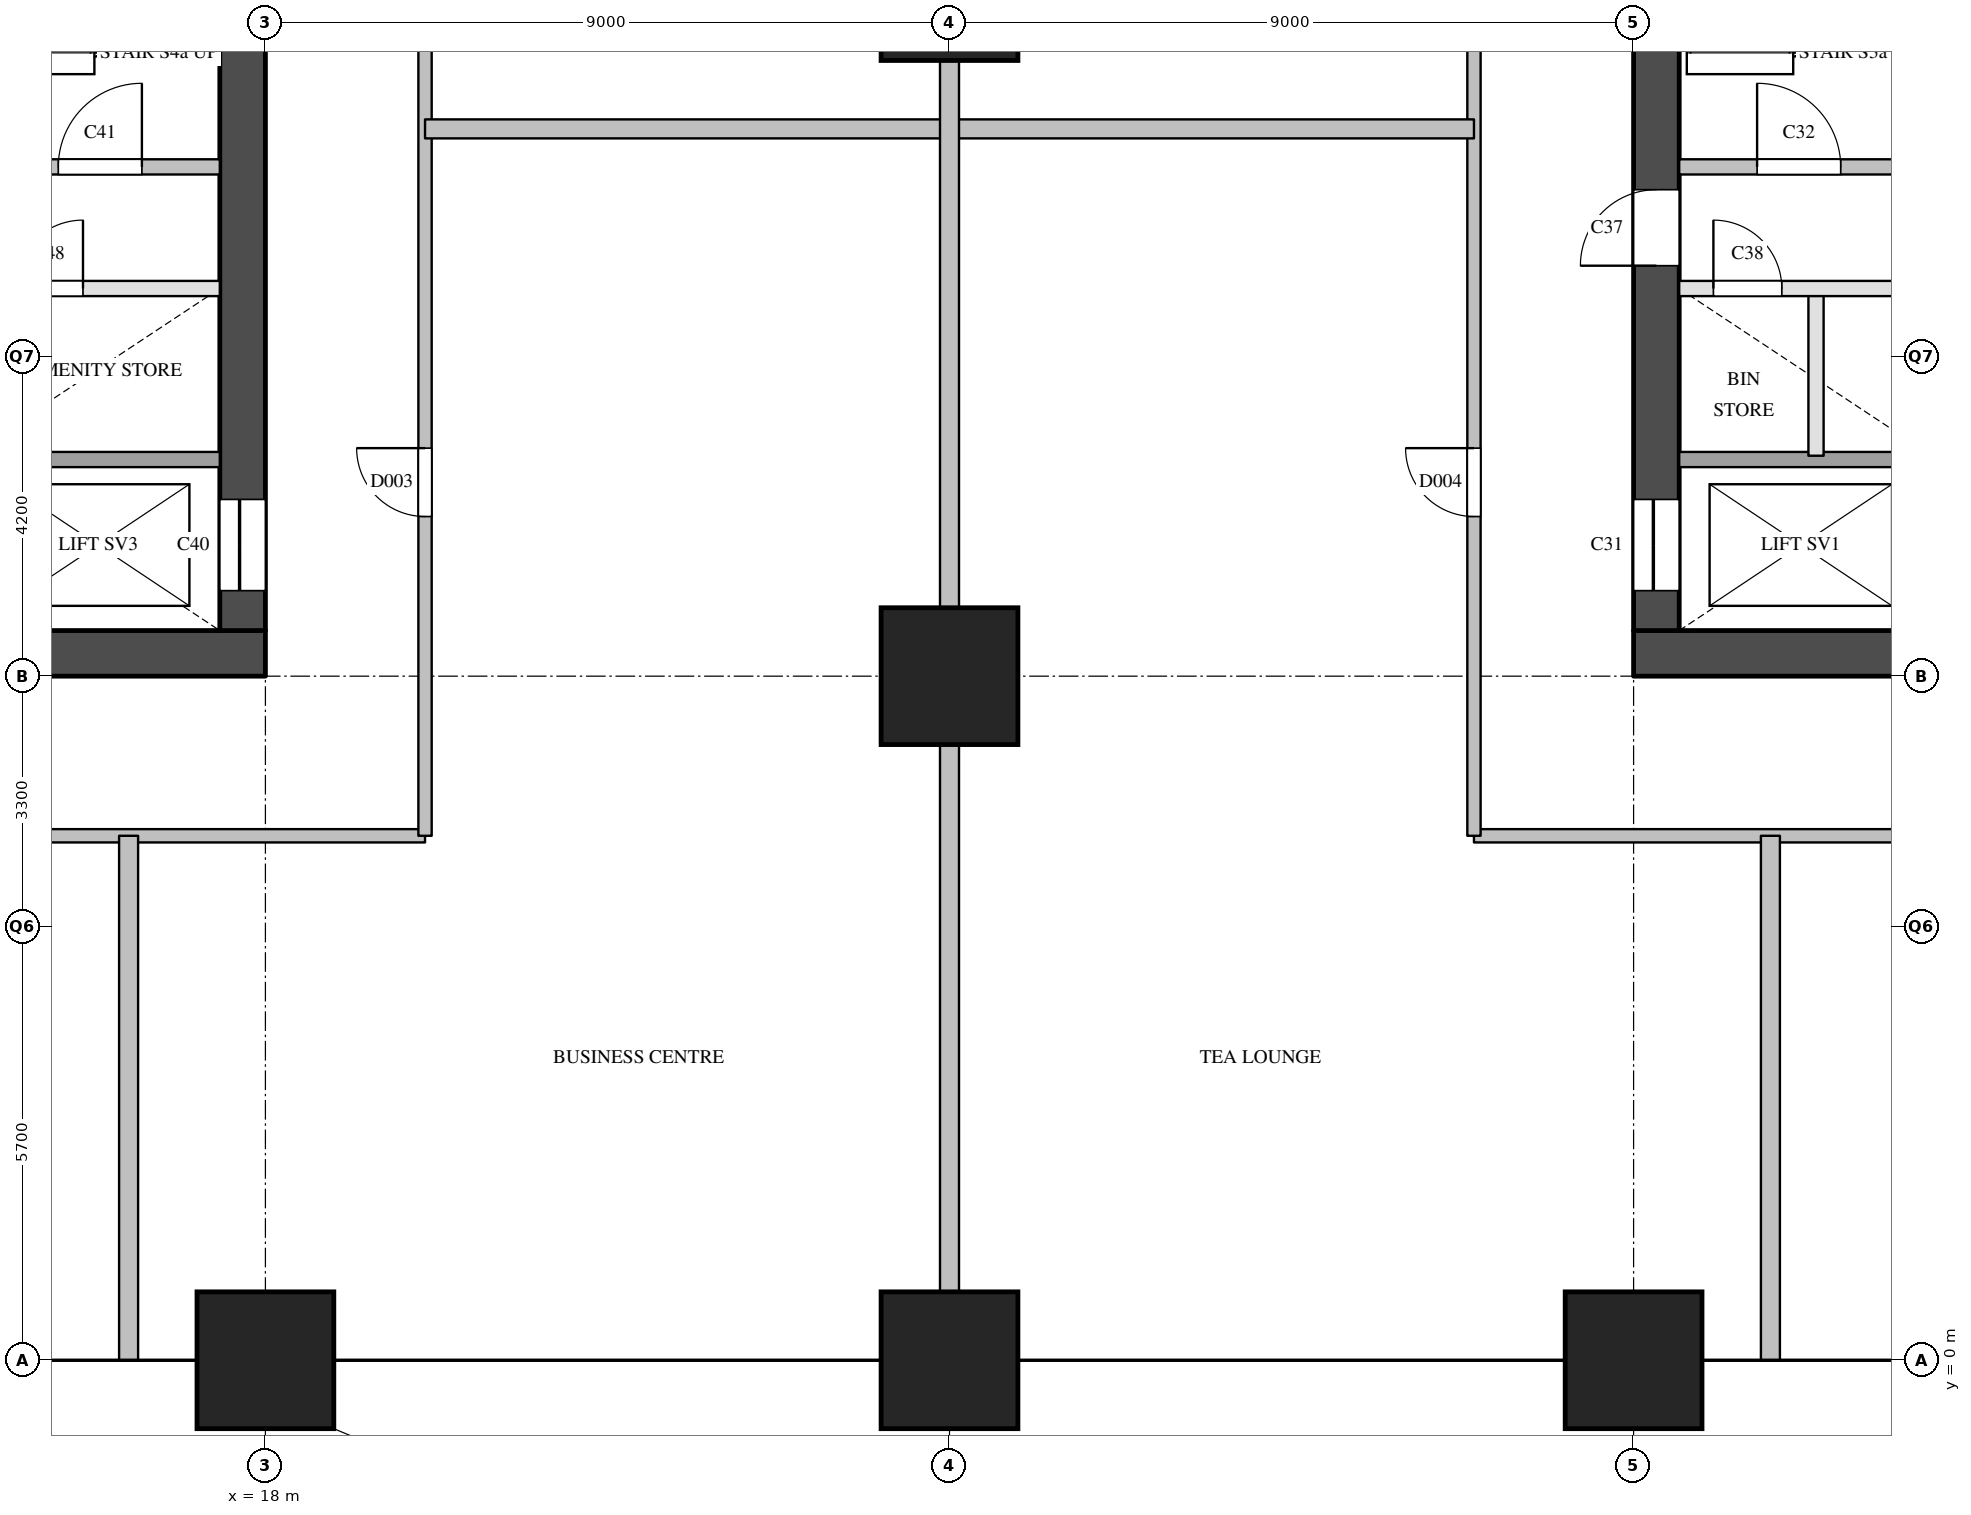
"""IFC4 building model, lengths in metres.
Left out: names, types, materials, properties, quantities, classifications, styles, units other than length and angle.
Written with IfcOpenShell. Run it as: python <this file> out.ifc"""

import sys

from ifc_helpers import new_model, si_unit, direction, frame, frame_2d, origin, origin_2d, place, context, subcontext, project, spatial, rectangle, extrude, element, fill, save


model = new_model("IFC4")
c1 = context("Model", 3, precision=1e-05, world=origin(), true_north=direction((0.0, 1.0)))
c2 = subcontext(c1, "Body", "Model", "MODEL_VIEW")
j1 = project(units=[si_unit("LENGTHUNIT", "METRE"), si_unit("PLANEANGLEUNIT", "RADIAN")], contexts=[c1])
p1 = place(None, origin())
s1 = spatial("IfcSite", under=j1, at=p1, CompositionType="ELEMENT")
p2 = place(p1, origin())
s2 = spatial("IfcBuilding", under=s1, at=p2, CompositionType="ELEMENT")
p3 = place(p2, frame((0.0, 0.0, 61.4)))
s3 = spatial("IfcBuildingStorey", under=s2, at=p3, CompositionType="ELEMENT", Elevation=61.4)
for number, where, z_axis, x_axis in (
    (1, (18.0, 0.0, 0.0), (0.0, 0.0, 1.0), (1.0, 0.0, 0.0)),
    (2, (27.0, 0.0, 0.0), (0.0, 0.0, 1.0), (1.0, 0.0, 0.0)),
    (3, (27.0, 9.0, 0.0), (0.0, 0.0, 1.0), (1.0, 0.0, 0.0)),
    (4, (27.0, 18.0, 0.0), (0.0, 0.0, 1.0), (1.0, 0.0, 0.0)),
    (5, (36.0, 0.0, 0.0), (0.0, 0.0, 1.0), (1.0, 0.0, 0.0)),
):
    element("IfcColumn", number, at=place(p3, frame(where, z_axis=z_axis, x_axis=x_axis)), inside=s3, PredefinedType="COLUMN", context=c2, shape_type="SweptSolid", body=[
        extrude(rectangle(XDim=1.8, YDim=1.8, at=origin_2d()), origin(), (0.0, 0.0, 1.0), 3.8),
    ])
p4 = place(p3, frame((36.0, 9.3, 0.0), z_axis=(0.0, 0.0, 1.0), x_axis=(1.0, 0.0, 0.0)))
e6 = element("IfcWall", 6, at=p4, inside=s3, PredefinedType="SHEAR", context=c2, shape_type="SweptSolid", body=[
    extrude(rectangle(XDim=9.0, YDim=0.6, at=frame_2d((4.5, 0.0))), origin(), (0.0, 0.0, 1.0), 3.5),
])
p5 = place(p3, frame((36.3, 9.6, 0.0), z_axis=(0.0, 0.0, 1.0), x_axis=(0.0, 1.0, 0.0)))
e7 = element("IfcWall", 7, at=p5, inside=s3, PredefinedType="SHEAR", context=c2, shape_type="SweptSolid", body=[
    extrude(rectangle(XDim=12.3, YDim=0.6, at=frame_2d((6.15, 0.0))), origin(), (0.0, 0.0, 1.0), 3.5),
])
p6 = place(p5, frame((0.525, 0.0, 0.0)))
e8 = element("IfcOpeningElement", 8, at=p6, cuts=e7, PredefinedType="OPENING", context=c2, shape_type="SweptSolid", body=[
    extrude(rectangle(XDim=1.2, YDim=2.1, at=frame_2d((0.6, 1.05))), frame((0.0, 0.31, 0.0), z_axis=(0.0, -1.0, 0.0), x_axis=(1.0, 0.0, 0.0)), (0.0, 0.0, 1.0), 0.62),
])
p7 = place(p5, frame((4.8, 0.0, 0.0)))
e9 = element("IfcOpeningElement", 9, at=p7, cuts=e7, PredefinedType="OPENING", context=c2, shape_type="SweptSolid", body=[
    extrude(rectangle(XDim=1.0, YDim=2.1, at=frame_2d((0.5, 1.05))), frame((0.0, 0.31, 0.0), z_axis=(0.0, -1.0, 0.0), x_axis=(1.0, 0.0, 0.0)), (0.0, 0.0, 1.0), 0.62),
])
p8 = place(p3, frame((38.4, 11.9, 0.0), z_axis=(0.0, 0.0, 1.0), x_axis=(0.0, 1.0, 0.0)))
e10 = element("IfcWall", 10, at=p8, inside=s3, PredefinedType="PARTITIONING", context=c2, shape_type="SweptSolid", body=[
    extrude(rectangle(XDim=2.2, YDim=0.2, at=frame_2d((1.1, 0.0))), origin(), (0.0, 0.0, 1.0), 3.5),
])
p9 = place(p3, frame((36.6, 11.85, 0.0), z_axis=(0.0, 0.0, 1.0), x_axis=(1.0, 0.0, 0.0)))
e11 = element("IfcWall", 11, at=p9, inside=s3, PredefinedType="SOLIDWALL", context=c2, shape_type="SweptSolid", body=[
    extrude(rectangle(XDim=7.8, YDim=0.2, at=frame_2d((3.9, 0.0))), origin(), (0.0, 0.0, 1.0), 3.5),
])
p10 = place(p3, frame((36.6, 14.1, 0.0), z_axis=(0.0, 0.0, 1.0), x_axis=(1.0, 0.0, 0.0)))
e12 = element("IfcWall", 12, at=p10, inside=s3, PredefinedType="PARTITIONING", context=c2, shape_type="SweptSolid", body=[
    extrude(rectangle(XDim=6.0, YDim=0.2, at=frame_2d((3.0, 0.0))), origin(), (0.0, 0.0, 1.0), 3.5),
])
p11 = place(p10, frame((0.45, 0.0, 0.0)))
e13 = element("IfcOpeningElement", 13, at=p11, cuts=e12, PredefinedType="OPENING", context=c2, shape_type="SweptSolid", body=[
    extrude(rectangle(XDim=0.9, YDim=2.1, at=frame_2d((0.45, 1.05))), frame((0.0, 0.11, 0.0), z_axis=(0.0, -1.0, 0.0), x_axis=(1.0, 0.0, 0.0)), (0.0, 0.0, 1.0), 0.22),
])
p12 = place(p10, frame((3.45, 0.0, 0.0)))
e14 = element("IfcOpeningElement", 14, at=p12, cuts=e12, PredefinedType="OPENING", context=c2, shape_type="SweptSolid", body=[
    extrude(rectangle(XDim=0.9, YDim=2.1, at=frame_2d((0.45, 1.05))), frame((0.0, 0.11, 0.0), z_axis=(0.0, -1.0, 0.0), x_axis=(1.0, 0.0, 0.0)), (0.0, 0.0, 1.0), 0.22),
])
p13 = place(p3, frame((36.6, 15.7, 0.0), z_axis=(0.0, 0.0, 1.0), x_axis=(1.0, 0.0, 0.0)))
e15 = element("IfcWall", 15, at=p13, inside=s3, PredefinedType="SOLIDWALL", context=c2, shape_type="SweptSolid", body=[
    extrude(rectangle(XDim=6.3, YDim=0.2, at=frame_2d((3.15, 0.0))), origin(), (0.0, 0.0, 1.0), 3.5),
])
p14 = place(p13, frame((1.025, 0.0, 0.0)))
e16 = element("IfcOpeningElement", 16, at=p14, cuts=e15, PredefinedType="OPENING", context=c2, shape_type="SweptSolid", body=[
    extrude(rectangle(XDim=1.1, YDim=2.1, at=frame_2d((0.55, 1.05))), frame((0.0, 0.11, 0.0), z_axis=(0.0, -1.0, 0.0), x_axis=(1.0, 0.0, 0.0)), (0.0, 0.0, 1.0), 0.22),
])
p15 = place(p13, frame((4.175, 0.0, 0.0)))
e17 = element("IfcOpeningElement", 17, at=p15, cuts=e15, PredefinedType="OPENING", context=c2, shape_type="SweptSolid", body=[
    extrude(rectangle(XDim=1.1, YDim=2.1, at=frame_2d((0.55, 1.05))), frame((0.0, 0.11, 0.0), z_axis=(0.0, -1.0, 0.0), x_axis=(1.0, 0.0, 0.0)), (0.0, 0.0, 1.0), 0.22),
])
p16 = place(p3, frame((9.0, 9.3, 0.0), z_axis=(0.0, 0.0, 1.0), x_axis=(1.0, 0.0, 0.0)))
e18 = element("IfcWall", 18, at=p16, inside=s3, PredefinedType="SHEAR", context=c2, shape_type="SweptSolid", body=[
    extrude(rectangle(XDim=9.0, YDim=0.6, at=frame_2d((4.5, 0.0))), origin(), (0.0, 0.0, 1.0), 3.5),
])
p17 = place(p3, frame((17.7, 9.6, 0.0), z_axis=(0.0, 0.0, 1.0), x_axis=(0.0, 1.0, 0.0)))
e19 = element("IfcWall", 19, at=p17, inside=s3, PredefinedType="SHEAR", context=c2, shape_type="SweptSolid", body=[
    extrude(rectangle(XDim=12.3, YDim=0.6, at=frame_2d((6.15, 0.0))), origin(), (0.0, 0.0, 1.0), 3.5),
])
p18 = place(p17, frame((0.525, 0.0, 0.0)))
e20 = element("IfcOpeningElement", 20, at=p18, cuts=e19, PredefinedType="OPENING", context=c2, shape_type="SweptSolid", body=[
    extrude(rectangle(XDim=1.2, YDim=2.1, at=frame_2d((0.6, 1.05))), frame((0.0, 0.31, 0.0), z_axis=(0.0, -1.0, 0.0), x_axis=(1.0, 0.0, 0.0)), (0.0, 0.0, 1.0), 0.62),
])
p19 = place(p3, frame((9.6, 11.85, 0.0), z_axis=(0.0, 0.0, 1.0), x_axis=(1.0, 0.0, 0.0)))
e21 = element("IfcWall", 21, at=p19, inside=s3, PredefinedType="SOLIDWALL", context=c2, shape_type="SweptSolid", body=[
    extrude(rectangle(XDim=7.8, YDim=0.2, at=frame_2d((3.9, 0.0))), origin(), (0.0, 0.0, 1.0), 3.5),
])
p20 = place(p3, frame((11.4, 14.1, 0.0), z_axis=(0.0, 0.0, 1.0), x_axis=(1.0, 0.0, 0.0)))
e22 = element("IfcWall", 22, at=p20, inside=s3, PredefinedType="PARTITIONING", context=c2, shape_type="SweptSolid", body=[
    extrude(rectangle(XDim=6.0, YDim=0.2, at=frame_2d((3.0, 0.0))), origin(), (0.0, 0.0, 1.0), 3.5),
])
p21 = place(p20, frame((0.3, 0.0, 0.0)))
e23 = element("IfcOpeningElement", 23, at=p21, cuts=e22, PredefinedType="OPENING", context=c2, shape_type="SweptSolid", body=[
    extrude(rectangle(XDim=0.9, YDim=2.1, at=frame_2d((0.45, 1.05))), frame((0.0, 0.11, 0.0), z_axis=(0.0, -1.0, 0.0), x_axis=(1.0, 0.0, 0.0)), (0.0, 0.0, 1.0), 0.22),
])
p22 = place(p20, frame((3.3, 0.0, 0.0)))
e24 = element("IfcOpeningElement", 24, at=p22, cuts=e22, PredefinedType="OPENING", context=c2, shape_type="SweptSolid", body=[
    extrude(rectangle(XDim=0.9, YDim=2.1, at=frame_2d((0.45, 1.05))), frame((0.0, 0.11, 0.0), z_axis=(0.0, -1.0, 0.0), x_axis=(1.0, 0.0, 0.0)), (0.0, 0.0, 1.0), 0.22),
])
p23 = place(p3, frame((11.1, 15.7, 0.0), z_axis=(0.0, 0.0, 1.0), x_axis=(1.0, 0.0, 0.0)))
e25 = element("IfcWall", 25, at=p23, inside=s3, PredefinedType="SOLIDWALL", context=c2, shape_type="SweptSolid", body=[
    extrude(rectangle(XDim=6.3, YDim=0.2, at=frame_2d((3.15, 0.0))), origin(), (0.0, 0.0, 1.0), 3.5),
])
p24 = place(p23, frame((4.175, 0.0, 0.0)))
e26 = element("IfcOpeningElement", 26, at=p24, cuts=e25, PredefinedType="OPENING", context=c2, shape_type="SweptSolid", body=[
    extrude(rectangle(XDim=1.1, YDim=2.1, at=frame_2d((0.55, 1.05))), frame((0.0, 0.11, 0.0), z_axis=(0.0, -1.0, 0.0), x_axis=(1.0, 0.0, 0.0)), (0.0, 0.0, 1.0), 0.22),
])
p25 = place(p23, frame((1.025, 0.0, 0.0)))
e27 = element("IfcOpeningElement", 27, at=p25, cuts=e25, PredefinedType="OPENING", context=c2, shape_type="SweptSolid", body=[
    extrude(rectangle(XDim=1.1, YDim=2.1, at=frame_2d((0.55, 1.05))), frame((0.0, 0.11, 0.0), z_axis=(0.0, -1.0, 0.0), x_axis=(1.0, 0.0, 0.0)), (0.0, 0.0, 1.0), 0.22),
])
p26 = place(p3, frame((6.9, 6.9, 0.0), z_axis=(0.0, 0.0, 1.0), x_axis=(1.0, 0.0, 0.0)))
e28 = element("IfcWall", 28, at=p26, inside=s3, PredefinedType="PARTITIONING", context=c2, shape_type="SweptSolid", body=[
    extrude(rectangle(XDim=13.2, YDim=0.175, at=frame_2d((6.6, 0.0))), origin(), (0.0, 0.0, 1.0), 3.5),
])
p27 = place(p26, frame((4.2, 0.0, 0.0)))
e29 = element("IfcOpeningElement", 29, at=p27, cuts=e28, PredefinedType="OPENING", context=c2, shape_type="SweptSolid", body=[
    extrude(rectangle(XDim=0.9, YDim=2.1, at=frame_2d((0.45, 1.05))), frame((0.0, 0.097, 0.0), z_axis=(0.0, -1.0, 0.0), x_axis=(1.0, 0.0, 0.0)), (0.0, 0.0, 1.0), 0.195),
])
p28 = place(p3, frame((33.9, 6.9, 0.0), z_axis=(0.0, 0.0, 1.0), x_axis=(1.0, 0.0, 0.0)))
e30 = element("IfcWall", 30, at=p28, inside=s3, PredefinedType="PARTITIONING", context=c2, shape_type="SweptSolid", body=[
    extrude(rectangle(XDim=13.2, YDim=0.175, at=frame_2d((6.6, 0.0))), origin(), (0.0, 0.0, 1.0), 3.5),
])
p29 = place(p28, frame((8.1, 0.0, 0.0)))
e31 = element("IfcOpeningElement", 31, at=p29, cuts=e30, PredefinedType="OPENING", context=c2, shape_type="SweptSolid", body=[
    extrude(rectangle(XDim=0.9, YDim=2.1, at=frame_2d((0.45, 1.05))), frame((0.0, 0.097, 0.0), z_axis=(0.0, -1.0, 0.0), x_axis=(1.0, 0.0, 0.0)), (0.0, 0.0, 1.0), 0.195),
])
p30 = place(p3, frame((20.1, 6.9, 0.0), z_axis=(0.0, 0.0, 1.0), x_axis=(0.0, 1.0, 0.0)))
e32 = element("IfcWall", 32, at=p30, inside=s3, PredefinedType="PARTITIONING", context=c2, shape_type="SweptSolid", body=[
    extrude(rectangle(XDim=17.69, YDim=0.175, at=frame_2d((8.845, 0.0))), origin(), (0.0, 0.0, 1.0), 3.5),
])
p31 = place(p30, frame((4.2, 0.0, 0.0)))
e33 = element("IfcOpeningElement", 33, at=p31, cuts=e32, PredefinedType="OPENING", context=c2, shape_type="SweptSolid", body=[
    extrude(rectangle(XDim=0.9, YDim=2.1, at=frame_2d((0.45, 1.05))), frame((0.0, 0.097, 0.0), z_axis=(0.0, -1.0, 0.0), x_axis=(1.0, 0.0, 0.0)), (0.0, 0.0, 1.0), 0.195),
])
p32 = place(p30, frame((12.995, 0.0, 0.0)))
e34 = element("IfcOpeningElement", 34, at=p32, cuts=e32, PredefinedType="OPENING", context=c2, shape_type="SweptSolid", body=[
    extrude(rectangle(XDim=1.0, YDim=2.1, at=frame_2d((0.5, 1.05))), frame((0.0, 0.097, 0.0), z_axis=(0.0, -1.0, 0.0), x_axis=(1.0, 0.0, 0.0)), (0.0, 0.0, 1.0), 0.195),
])
p33 = place(p3, frame((33.9, 6.9, 0.0), z_axis=(0.0, 0.0, 1.0), x_axis=(0.0, 1.0, 0.0)))
e35 = element("IfcWall", 35, at=p33, inside=s3, PredefinedType="PARTITIONING", context=c2, shape_type="SweptSolid", body=[
    extrude(rectangle(XDim=17.69, YDim=0.175, at=frame_2d((8.845, 0.0))), origin(), (0.0, 0.0, 1.0), 3.5),
])
p34 = place(p33, frame((4.2, 0.0, 0.0)))
e36 = element("IfcOpeningElement", 36, at=p34, cuts=e35, PredefinedType="OPENING", context=c2, shape_type="SweptSolid", body=[
    extrude(rectangle(XDim=0.9, YDim=2.1, at=frame_2d((0.45, 1.05))), frame((0.0, 0.097, 0.0), z_axis=(0.0, -1.0, 0.0), x_axis=(1.0, 0.0, 0.0)), (0.0, 0.0, 1.0), 0.195),
])
p35 = place(p33, frame((12.995, 0.0, 0.0)))
e37 = element("IfcOpeningElement", 37, at=p35, cuts=e35, PredefinedType="OPENING", context=c2, shape_type="SweptSolid", body=[
    extrude(rectangle(XDim=1.0, YDim=2.1, at=frame_2d((0.5, 1.05))), frame((0.0, 0.097, 0.0), z_axis=(0.0, -1.0, 0.0), x_axis=(1.0, 0.0, 0.0)), (0.0, 0.0, 1.0), 0.195),
])
p36 = place(p3, frame((20.1, 16.2, 0.0), z_axis=(0.0, 0.0, 1.0), x_axis=(1.0, 0.0, 0.0)))
e38 = element("IfcWall", 38, at=p36, inside=s3, PredefinedType="PARTITIONING", context=c2, shape_type="SweptSolid", body=[
    extrude(rectangle(XDim=13.8, YDim=0.25, at=frame_2d((6.9, 0.0))), origin(), (0.0, 0.0, 1.0), 2.5),
])
p37 = place(p3, frame((16.2, 0.0, 0.0), z_axis=(0.0, 0.0, 1.0), x_axis=(0.0, 1.0, 0.0)))
e39 = element("IfcWall", 39, at=p37, inside=s3, PredefinedType="PARTITIONING", context=c2, shape_type="SweptSolid", body=[
    extrude(rectangle(XDim=6.9, YDim=0.25, at=frame_2d((3.45, 0.0))), origin(), (0.0, 0.0, 1.0), 2.5),
])
p38 = place(p3, frame((27.0, 0.0, 0.0), z_axis=(0.0, 0.0, 1.0), x_axis=(0.0, 1.0, 0.0)))
e40 = element("IfcWall", 40, at=p38, inside=s3, PredefinedType="PARTITIONING", context=c2, shape_type="SweptSolid", body=[
    extrude(rectangle(XDim=54.0, YDim=0.25, at=frame_2d((27.0, 0.0))), origin(), (0.0, 0.0, 1.0), 2.5),
])
p39 = place(p3, frame((37.8, 0.0, 0.0), z_axis=(0.0, 0.0, 1.0), x_axis=(0.0, 1.0, 0.0)))
e41 = element("IfcWall", 41, at=p39, inside=s3, PredefinedType="PARTITIONING", context=c2, shape_type="SweptSolid", body=[
    extrude(rectangle(XDim=6.9, YDim=0.25, at=frame_2d((3.45, 0.0))), origin(), (0.0, 0.0, 1.0), 2.5),
])
p40 = place(p6, origin())
e42 = element("IfcDoor", 42, at=p40, inside=s3, OperationType="SLIDING_TO_LEFT", PredefinedType="DOOR", context=c2, shape_type="SweptSolid", body=[
    extrude(rectangle(XDim=1.2, YDim=2.1, at=frame_2d((0.6, 1.05))), frame((0.0, 0.025, 0.0), z_axis=(0.0, -1.0, 0.0), x_axis=(1.0, 0.0, 0.0)), (0.0, 0.0, 1.0), 0.05),
])
fill(e8, e42)
p41 = place(p14, origin())
e43 = element("IfcDoor", 43, at=p41, inside=s3, OperationType="SINGLE_SWING_LEFT", PredefinedType="DOOR", context=c2, shape_type="SweptSolid", body=[
    extrude(rectangle(XDim=1.1, YDim=2.1, at=frame_2d((0.55, 1.05))), frame((0.0, 0.025, 0.0), z_axis=(0.0, -1.0, 0.0), x_axis=(1.0, 0.0, 0.0)), (0.0, 0.0, 1.0), 0.05),
])
fill(e16, e43)
p42 = place(p7, origin())
e44 = element("IfcDoor", 44, at=p42, inside=s3, OperationType="SINGLE_SWING_LEFT", PredefinedType="DOOR", context=c2, shape_type="SweptSolid", body=[
    extrude(rectangle(XDim=1.0, YDim=2.1, at=frame_2d((0.5, 1.05))), frame((0.0, 0.025, 0.0), z_axis=(0.0, -1.0, 0.0), x_axis=(1.0, 0.0, 0.0)), (0.0, 0.0, 1.0), 0.05),
])
fill(e9, e44)
p43 = place(p11, origin())
e45 = element("IfcDoor", 45, at=p43, inside=s3, OperationType="SINGLE_SWING_LEFT", PredefinedType="DOOR", context=c2, shape_type="SweptSolid", body=[
    extrude(rectangle(XDim=0.9, YDim=2.1, at=frame_2d((0.45, 1.05))), frame((0.0, 0.025, 0.0), z_axis=(0.0, -1.0, 0.0), x_axis=(1.0, 0.0, 0.0)), (0.0, 0.0, 1.0), 0.05),
])
fill(e13, e45)
p44 = place(p18, origin())
e46 = element("IfcDoor", 46, at=p44, inside=s3, OperationType="SLIDING_TO_LEFT", PredefinedType="DOOR", context=c2, shape_type="SweptSolid", body=[
    extrude(rectangle(XDim=1.2, YDim=2.1, at=frame_2d((0.6, 1.05))), frame((0.0, 0.025, 0.0), z_axis=(0.0, -1.0, 0.0), x_axis=(1.0, 0.0, 0.0)), (0.0, 0.0, 1.0), 0.05),
])
fill(e20, e46)
p45 = place(p24, origin())
e47 = element("IfcDoor", 47, at=p45, inside=s3, OperationType="SINGLE_SWING_RIGHT", PredefinedType="DOOR", context=c2, shape_type="SweptSolid", body=[
    extrude(rectangle(XDim=1.1, YDim=2.1, at=frame_2d((0.55, 1.05))), frame((0.0, 0.025, 0.0), z_axis=(0.0, -1.0, 0.0), x_axis=(1.0, 0.0, 0.0)), (0.0, 0.0, 1.0), 0.05),
])
fill(e26, e47)
p46 = place(p22, origin())
e48 = element("IfcDoor", 48, at=p46, inside=s3, OperationType="SINGLE_SWING_RIGHT", PredefinedType="DOOR", context=c2, shape_type="SweptSolid", body=[
    extrude(rectangle(XDim=0.9, YDim=2.1, at=frame_2d((0.45, 1.05))), frame((0.0, 0.025, 0.0), z_axis=(0.0, -1.0, 0.0), x_axis=(1.0, 0.0, 0.0)), (0.0, 0.0, 1.0), 0.05),
])
fill(e24, e48)
p47 = place(p31, origin())
e49 = element("IfcDoor", 49, at=p47, inside=s3, OperationType="SINGLE_SWING_RIGHT", PredefinedType="DOOR", context=c2, shape_type="SweptSolid", body=[
    extrude(rectangle(XDim=0.9, YDim=2.1, at=frame_2d((0.45, 1.05))), frame((0.0, 0.025, 0.0), z_axis=(0.0, -1.0, 0.0), x_axis=(1.0, 0.0, 0.0)), (0.0, 0.0, 1.0), 0.05),
])
fill(e33, e49)
p48 = place(p34, origin())
e50 = element("IfcDoor", 50, at=p48, inside=s3, OperationType="SINGLE_SWING_RIGHT", PredefinedType="DOOR", context=c2, shape_type="SweptSolid", body=[
    extrude(rectangle(XDim=0.9, YDim=2.1, at=frame_2d((0.45, 1.05))), frame((0.0, 0.025, 0.0), z_axis=(0.0, -1.0, 0.0), x_axis=(1.0, 0.0, 0.0)), (0.0, 0.0, 1.0), 0.05),
])
fill(e36, e50)
save(model, sys.argv[1])
